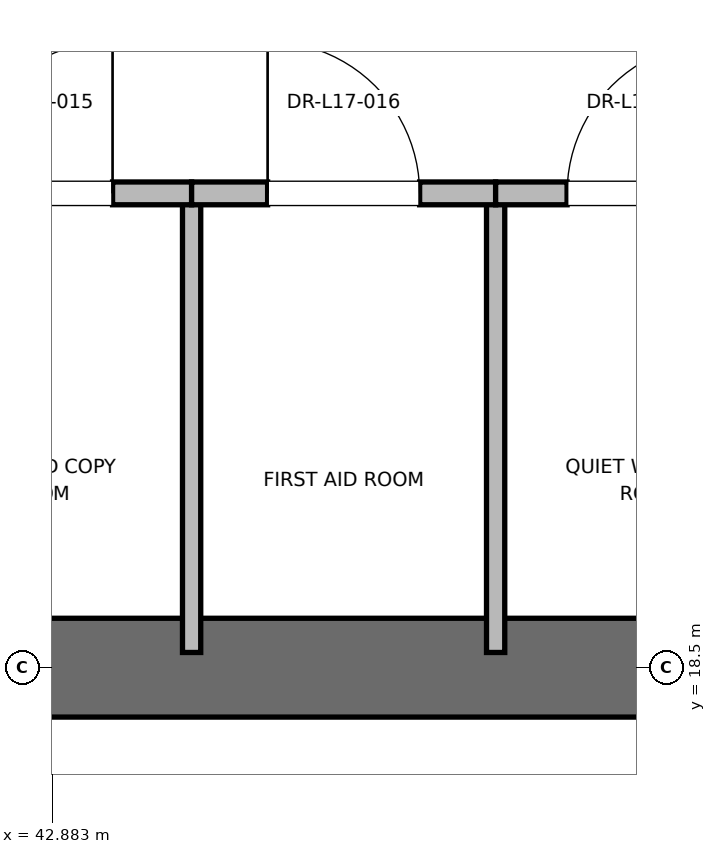
"""IFC4 building model, lengths in metres.
Left out: names, types, materials, properties, quantities, classifications, styles, units other than length and angle.
Written with IfcOpenShell. Run it as: python <this file> out.ifc"""

import sys

from ifc_helpers import new_model, si_unit, direction, frame, frame_2d, origin, place, context, subcontext, project, spatial, rectangle, extrude, element, fill, save


model = new_model("IFC4")
c1 = context("Model", 3, precision=1e-05, world=origin(), true_north=direction((0.0, 1.0)))
c2 = subcontext(c1, "Body", "Model", "MODEL_VIEW")
j1 = project(units=[si_unit("LENGTHUNIT", "METRE"), si_unit("PLANEANGLEUNIT", "RADIAN")], contexts=[c1])
p1 = place(None, origin())
s1 = spatial("IfcSite", under=j1, at=p1, CompositionType="ELEMENT")
p2 = place(p1, origin())
s2 = spatial("IfcBuilding", under=s1, at=p2, CompositionType="ELEMENT")
p3 = place(p2, frame((0.0, 0.0, 75.6)))
s3 = spatial("IfcBuildingStorey", under=s2, at=p3, CompositionType="ELEMENT", Elevation=75.6)
p4 = place(p3, frame((41.8, 18.5, 0.0), z_axis=(0.0, 0.0, 1.0), x_axis=(1.0, 0.0, 0.0)))
e1 = element("IfcWall", 1, at=p4, inside=s3, PredefinedType="SHEAR", context=c2, shape_type="SweptSolid", body=[
    extrude(rectangle(XDim=9.2, YDim=0.65, at=frame_2d((4.6, 0.0))), origin(), (0.0, 0.0, 1.0), 3.76),
])
for number, where, z_axis, x_axis in (
    (2, (43.8, 18.6, 0.0), (0.0, 0.0, 1.0), (0.0, 1.0, 0.0)),
    (3, (45.8, 18.6, 0.0), (0.0, 0.0, 1.0), (0.0, 1.0, 0.0)),
):
    element("IfcWall", number, at=place(p3, frame(where, z_axis=z_axis, x_axis=x_axis)), inside=s3, PredefinedType="PARTITIONING", context=c2, shape_type="SweptSolid", body=[
        extrude(rectangle(XDim=3.02, YDim=0.12, at=frame_2d((1.51, 0.0))), origin(), (0.0, 0.0, 1.0), 2.85),
    ])
p5 = place(p3, frame((41.76, 21.62, 0.0), z_axis=(0.0, 0.0, 1.0), x_axis=(1.0, 0.0, 0.0)))
e4 = element("IfcWall", 4, at=p5, inside=s3, PredefinedType="PARTITIONING", context=c2, shape_type="SweptSolid", body=[
    extrude(rectangle(XDim=2.04, YDim=0.15, at=frame_2d((1.02, 0.0))), origin(), (0.0, 0.0, 1.0), 2.85),
])
p6 = place(p5, frame((0.52, 0.0, 0.0)))
e5 = element("IfcOpeningElement", 5, at=p6, cuts=e4, PredefinedType="OPENING", context=c2, shape_type="SweptSolid", body=[
    extrude(rectangle(XDim=1.0, YDim=2.15, at=frame_2d((0.5, 1.075))), frame((0.0, 0.075, 0.0), z_axis=(0.0, -1.0, 0.0), x_axis=(1.0, 0.0, 0.0)), (0.0, 0.0, 1.0), 0.15),
])
p7 = place(p3, frame((43.8, 21.62, 0.0), z_axis=(0.0, 0.0, 1.0), x_axis=(1.0, 0.0, 0.0)))
e6 = element("IfcWall", 6, at=p7, inside=s3, PredefinedType="PARTITIONING", context=c2, shape_type="SweptSolid", body=[
    extrude(rectangle(XDim=2.0, YDim=0.15, at=frame_2d((1.0, 0.0))), origin(), (0.0, 0.0, 1.0), 2.85),
])
p8 = place(p7, frame((0.5, 0.0, 0.0)))
e7 = element("IfcOpeningElement", 7, at=p8, cuts=e6, PredefinedType="OPENING", context=c2, shape_type="SweptSolid", body=[
    extrude(rectangle(XDim=1.0, YDim=2.15, at=frame_2d((0.5, 1.075))), frame((0.0, 0.075, 0.0), z_axis=(0.0, -1.0, 0.0), x_axis=(1.0, 0.0, 0.0)), (0.0, 0.0, 1.0), 0.15),
])
p9 = place(p3, frame((45.8, 21.62, 0.0), z_axis=(0.0, 0.0, 1.0), x_axis=(1.0, 0.0, 0.0)))
e8 = element("IfcWall", 8, at=p9, inside=s3, PredefinedType="PARTITIONING", context=c2, shape_type="SweptSolid", body=[
    extrude(rectangle(XDim=1.94, YDim=0.15, at=frame_2d((0.97, 0.0))), origin(), (0.0, 0.0, 1.0), 2.85),
])
p10 = place(p9, frame((0.47, 0.0, 0.0)))
e9 = element("IfcOpeningElement", 9, at=p10, cuts=e8, PredefinedType="OPENING", context=c2, shape_type="SweptSolid", body=[
    extrude(rectangle(XDim=1.0, YDim=2.15, at=frame_2d((0.5, 1.075))), frame((0.0, 0.075, 0.0), z_axis=(0.0, -1.0, 0.0), x_axis=(1.0, 0.0, 0.0)), (0.0, 0.0, 1.0), 0.15),
])
p11 = place(p6, origin())
e10 = element("IfcDoor", 10, at=p11, inside=s3, OperationType="SINGLE_SWING_RIGHT", PredefinedType="DOOR", context=c2, shape_type="SweptSolid", body=[
    extrude(rectangle(XDim=1.0, YDim=2.15, at=frame_2d((0.5, 1.075))), frame((0.0, 0.025, 0.0), z_axis=(0.0, -1.0, 0.0), x_axis=(1.0, 0.0, 0.0)), (0.0, 0.0, 1.0), 0.05),
])
fill(e5, e10)
p12 = place(p8, origin())
e11 = element("IfcDoor", 11, at=p12, inside=s3, OperationType="SINGLE_SWING_LEFT", PredefinedType="DOOR", context=c2, shape_type="SweptSolid", body=[
    extrude(rectangle(XDim=1.0, YDim=2.15, at=frame_2d((0.5, 1.075))), frame((0.0, 0.025, 0.0), z_axis=(0.0, -1.0, 0.0), x_axis=(1.0, 0.0, 0.0)), (0.0, 0.0, 1.0), 0.05),
])
fill(e7, e11)
p13 = place(p10, origin())
e12 = element("IfcDoor", 12, at=p13, inside=s3, OperationType="SINGLE_SWING_RIGHT", PredefinedType="DOOR", context=c2, shape_type="SweptSolid", body=[
    extrude(rectangle(XDim=1.0, YDim=2.15, at=frame_2d((0.5, 1.075))), frame((0.0, 0.025, 0.0), z_axis=(0.0, -1.0, 0.0), x_axis=(1.0, 0.0, 0.0)), (0.0, 0.0, 1.0), 0.05),
])
fill(e9, e12)
save(model, sys.argv[1])
